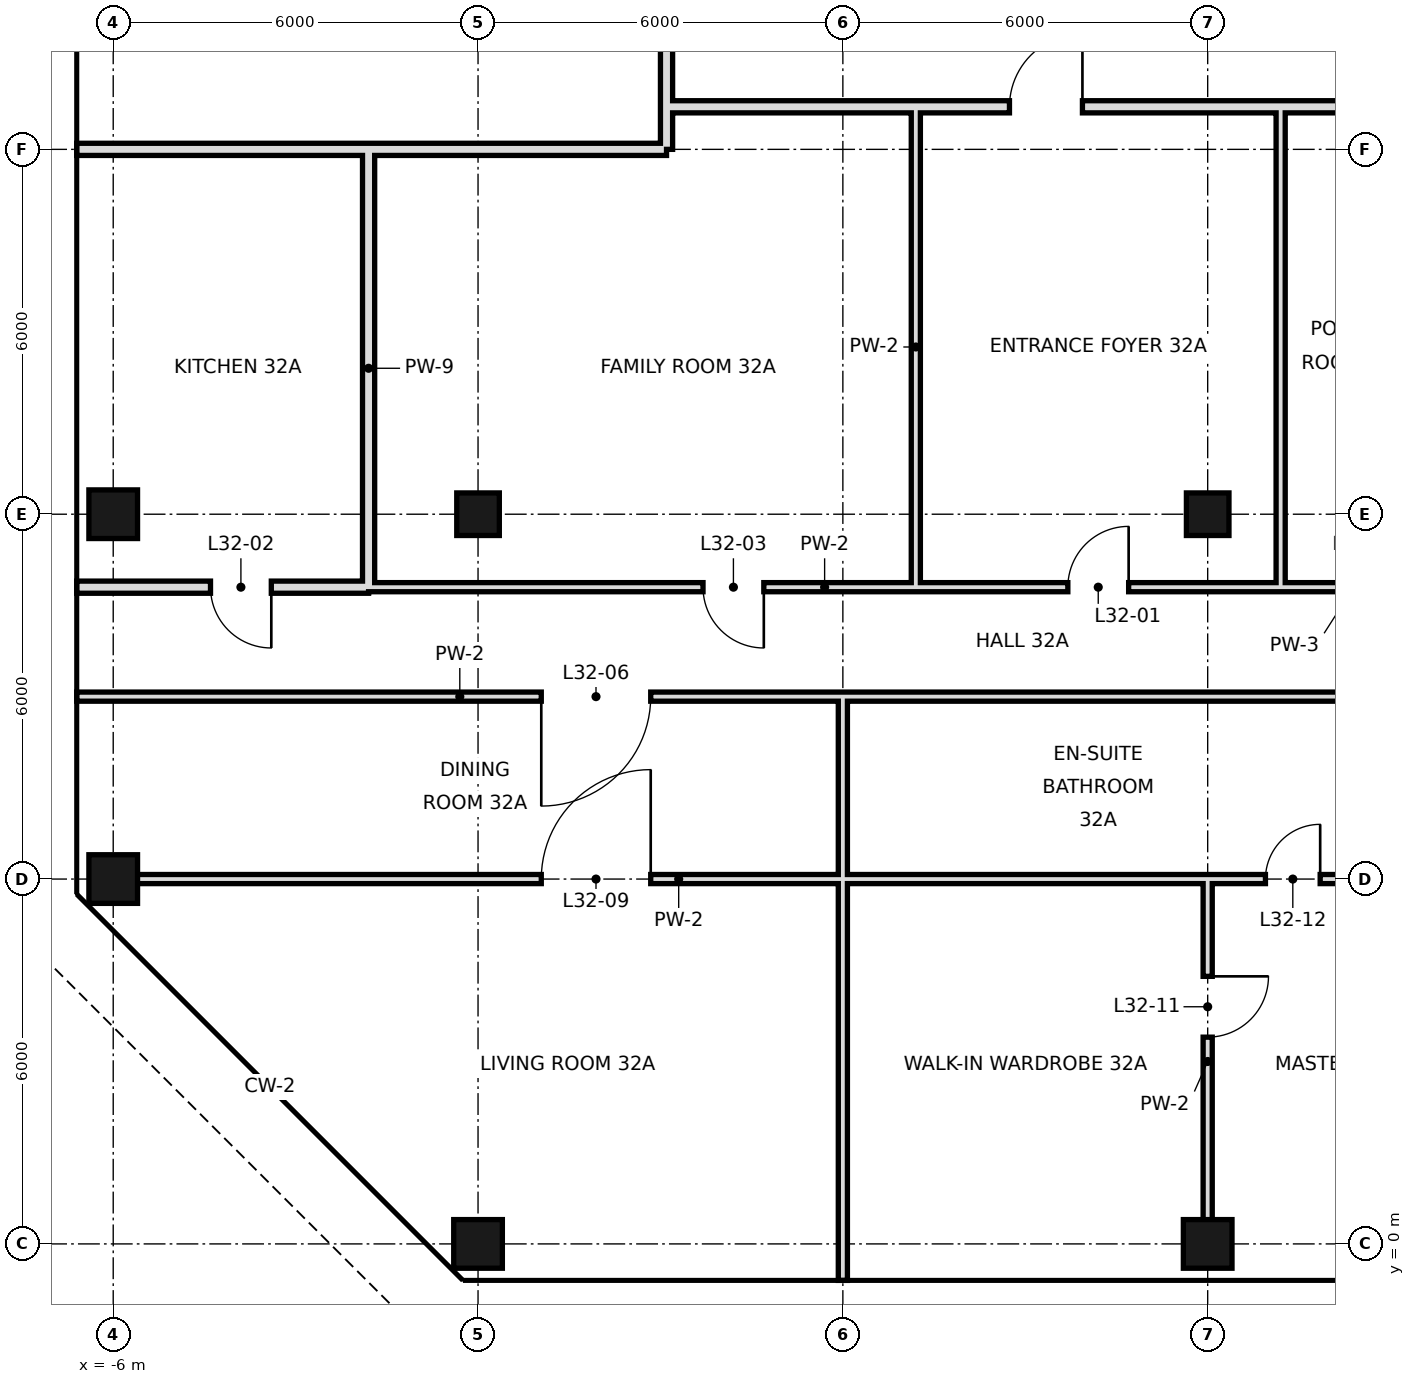
"""IFC4 building model, lengths in metres.
Left out: names, types, materials, properties, quantities, classifications, styles, units other than length and angle.
Written with IfcOpenShell. Run it as: python <this file> out.ifc"""

import sys

from ifc_helpers import new_model, si_unit, direction, frame, frame_2d, origin, origin_2d, place, context, subcontext, project, spatial, rectangle, hollow_rectangle, extrude, element, fill, save


model = new_model("IFC4")
c1 = context("Model", 3, precision=1e-05, world=origin(), true_north=direction((0.0, 1.0)))
c2 = subcontext(c1, "Body", "Model", "MODEL_VIEW")
j1 = project(units=[si_unit("LENGTHUNIT", "METRE"), si_unit("PLANEANGLEUNIT", "RADIAN")], contexts=[c1])
p1 = place(None, origin())
s1 = spatial("IfcSite", under=j1, at=p1, CompositionType="ELEMENT")
p2 = place(p1, origin())
s2 = spatial("IfcBuilding", under=s1, at=p2, CompositionType="ELEMENT")
p3 = place(p2, frame((0.0, 0.0, 143.8)))
s3 = spatial("IfcBuildingStorey", under=s2, at=p3, CompositionType="ELEMENT", Elevation=143.8)
for number, where, z_axis, x_axis in (
    (1, (-6.0, 6.0, 0.0), (0.0, 0.0, 1.0), (1.0, 0.0, 0.0)),
    (2, (-6.0, 12.0, 0.0), (0.0, 0.0, 1.0), (1.0, 0.0, 0.0)),
    (3, (0.0, 0.0, 0.0), (0.0, 0.0, 1.0), (1.0, 0.0, 0.0)),
):
    element("IfcColumn", number, at=place(p3, frame(where, z_axis=z_axis, x_axis=x_axis)), inside=s3, PredefinedType="COLUMN", context=c2, shape_type="SweptSolid", body=[
        extrude(hollow_rectangle(XDim=0.8, YDim=0.8, WallThickness=0.04, at=origin_2d()), origin(), (0.0, 0.0, 1.0), 3.6),
    ])
p4 = place(p3, frame((0.0, 12.0, 0.0), z_axis=(0.0, 0.0, 1.0), x_axis=(1.0, 0.0, 0.0)))
e4 = element("IfcColumn", 4, at=p4, inside=s3, PredefinedType="COLUMN", context=c2, shape_type="SweptSolid", body=[
    extrude(hollow_rectangle(XDim=0.7, YDim=0.7, WallThickness=0.036, at=origin_2d()), origin(), (0.0, 0.0, 1.0), 3.6),
])
p5 = place(p3, frame((12.0, 0.0, 0.0), z_axis=(0.0, 0.0, 1.0), x_axis=(1.0, 0.0, 0.0)))
e5 = element("IfcColumn", 5, at=p5, inside=s3, PredefinedType="COLUMN", context=c2, shape_type="SweptSolid", body=[
    extrude(hollow_rectangle(XDim=0.8, YDim=0.8, WallThickness=0.04, at=origin_2d()), origin(), (0.0, 0.0, 1.0), 3.6),
])
p6 = place(p3, frame((12.0, 12.0, 0.0), z_axis=(0.0, 0.0, 1.0), x_axis=(1.0, 0.0, 0.0)))
e6 = element("IfcColumn", 6, at=p6, inside=s3, PredefinedType="COLUMN", context=c2, shape_type="SweptSolid", body=[
    extrude(hollow_rectangle(XDim=0.7, YDim=0.7, WallThickness=0.036, at=origin_2d()), origin(), (0.0, 0.0, 1.0), 3.6),
])
p7 = place(p3, frame((-1.8, 10.8, 0.0), z_axis=(0.0, 0.0, 1.0), x_axis=(0.0, 1.0, 0.0)))
e7 = element("IfcWall", 7, at=p7, inside=s3, PredefinedType="SOLIDWALL", context=c2, shape_type="SweptSolid", body=[
    extrude(rectangle(XDim=7.2, YDim=0.2, at=frame_2d((3.6, 0.0))), origin(), (0.0, 0.0, 1.0), 3.42),
])
p8 = place(p3, frame((12.0, 0.0, 0.0), z_axis=(0.0, 0.0, 1.0), x_axis=(0.0, 1.0, 0.0)))
e8 = element("IfcWall", 8, at=p8, inside=s3, PredefinedType="PARTITIONING", context=c2, shape_type="SweptSolid", body=[
    extrude(rectangle(XDim=6.0, YDim=0.15, at=frame_2d((3.0, 0.0))), origin(), (0.0, 0.0, 1.0), 2.72),
])
p9 = place(p8, frame((3.4, 0.0, 0.0)))
e9 = element("IfcOpeningElement", 9, at=p9, cuts=e8, PredefinedType="OPENING", context=c2, shape_type="SweptSolid", body=[
    extrude(rectangle(XDim=1.0, YDim=2.4, at=frame_2d((0.5, 1.2))), frame((0.0, 0.085, 0.0), z_axis=(0.0, -1.0, 0.0), x_axis=(1.0, 0.0, 0.0)), (0.0, 0.0, 1.0), 0.17),
])
p10 = place(p3, frame((13.2, 10.8, 0.0), z_axis=(0.0, 0.0, 1.0), x_axis=(0.0, 1.0, 0.0)))
e10 = element("IfcWall", 10, at=p10, inside=s3, PredefinedType="PARTITIONING", context=c2, shape_type="SweptSolid", body=[
    extrude(rectangle(XDim=7.9, YDim=0.15, at=frame_2d((3.95, 0.0))), origin(), (0.0, 0.0, 1.0), 3.42),
])
p11 = place(p3, frame((3.1, 18.0, 0.0), z_axis=(0.0, 0.0, 1.0), x_axis=(0.0, 1.0, 0.0)))
e11 = element("IfcWall", 11, at=p11, inside=s3, PredefinedType="SOLIDWALL", context=c2, shape_type="SweptSolid", body=[
    extrude(rectangle(XDim=30.6, YDim=0.2, at=frame_2d((15.3, 0.0))), origin(), (0.0, 0.0, 1.0), 2.72),
])
p12 = place(p11, frame((20.27, 0.0, 0.0)))
e12 = element("IfcOpeningElement", 12, at=p12, cuts=e11, PredefinedType="OPENING", context=c2, shape_type="SweptSolid", body=[
    extrude(rectangle(XDim=1.2, YDim=2.4, at=frame_2d((0.6, 1.2))), frame((0.0, 0.11, 0.0), z_axis=(0.0, -1.0, 0.0), x_axis=(1.0, 0.0, 0.0)), (0.0, 0.0, 1.0), 0.22),
])
p13 = place(p3, frame((6.0, -0.6, 0.0), z_axis=(0.0, 0.0, 1.0), x_axis=(0.0, 1.0, 0.0)))
e13 = element("IfcWall", 13, at=p13, inside=s3, PredefinedType="PARTITIONING", context=c2, shape_type="SweptSolid", body=[
    extrude(rectangle(XDim=6.6, YDim=0.15, at=frame_2d((3.3, 0.0))), origin(), (0.0, 0.0, 1.0), 2.72),
])
p14 = place(p3, frame((6.0, 6.0, 0.0), z_axis=(0.0, 0.0, 1.0), x_axis=(0.0, 1.0, 0.0)))
e14 = element("IfcWall", 14, at=p14, inside=s3, PredefinedType="PARTITIONING", context=c2, shape_type="SweptSolid", body=[
    extrude(rectangle(XDim=3.0, YDim=0.15, at=frame_2d((1.5, 0.0))), origin(), (0.0, 0.0, 1.0), 2.72),
])
p15 = place(p3, frame((7.2, 10.8, 0.0), z_axis=(0.0, 0.0, 1.0), x_axis=(0.0, 1.0, 0.0)))
e15 = element("IfcWall", 15, at=p15, inside=s3, PredefinedType="PARTITIONING", context=c2, shape_type="SweptSolid", body=[
    extrude(rectangle(XDim=7.9, YDim=0.15, at=frame_2d((3.95, 0.0))), origin(), (0.0, 0.0, 1.0), 3.42),
])
p16 = place(p3, frame((-6.6, 10.8, 0.0), z_axis=(0.0, 0.0, 1.0), x_axis=(1.0, 0.0, 0.0)))
e16 = element("IfcWall", 16, at=p16, inside=s3, PredefinedType="SOLIDWALL", context=c2, shape_type="SweptSolid", body=[
    extrude(rectangle(XDim=4.8, YDim=0.2, at=frame_2d((2.4, 0.0))), origin(), (0.0, 0.0, 1.0), 2.97),
])
p17 = place(p16, frame((2.2, 0.0, 0.0)))
e17 = element("IfcOpeningElement", 17, at=p17, cuts=e16, PredefinedType="OPENING", context=c2, shape_type="SweptSolid", body=[
    extrude(rectangle(XDim=1.0, YDim=2.4, at=frame_2d((0.5, 1.2))), frame((0.0, 0.11, 0.0), z_axis=(0.0, -1.0, 0.0), x_axis=(1.0, 0.0, 0.0)), (0.0, 0.0, 1.0), 0.22),
])
p18 = place(p3, frame((-1.8, 10.8, 0.0), z_axis=(0.0, 0.0, 1.0), x_axis=(1.0, 0.0, 0.0)))
e18 = element("IfcWall", 18, at=p18, inside=s3, PredefinedType="PARTITIONING", context=c2, shape_type="SweptSolid", body=[
    extrude(rectangle(XDim=15.0, YDim=0.15, at=frame_2d((7.5, 0.0))), origin(), (0.0, 0.0, 1.0), 3.42),
])
p19 = place(p18, frame((11.5, 0.0, 0.0)))
e19 = element("IfcOpeningElement", 19, at=p19, cuts=e18, PredefinedType="OPENING", context=c2, shape_type="SweptSolid", body=[
    extrude(rectangle(XDim=1.0, YDim=2.4, at=frame_2d((0.5, 1.2))), frame((0.0, 0.085, 0.0), z_axis=(0.0, -1.0, 0.0), x_axis=(1.0, 0.0, 0.0)), (0.0, 0.0, 1.0), 0.17),
])
p20 = place(p18, frame((5.5, 0.0, 0.0)))
e20 = element("IfcOpeningElement", 20, at=p20, cuts=e18, PredefinedType="OPENING", context=c2, shape_type="SweptSolid", body=[
    extrude(rectangle(XDim=1.0, YDim=2.4, at=frame_2d((0.5, 1.2))), frame((0.0, 0.085, 0.0), z_axis=(0.0, -1.0, 0.0), x_axis=(1.0, 0.0, 0.0)), (0.0, 0.0, 1.0), 0.17),
])
p21 = place(p3, frame((13.2, 10.8, 0.0), z_axis=(0.0, 0.0, 1.0), x_axis=(1.0, 0.0, 0.0)))
e21 = element("IfcWall", 21, at=p21, inside=s3, PredefinedType="PARTITIONING", context=c2, shape_type="SweptSolid", body=[
    extrude(rectangle(XDim=2.4, YDim=0.15, at=frame_2d((1.2, 0.0))), origin(), (0.0, 0.0, 1.0), 3.42),
])
p22 = place(p21, frame((0.95, 0.0, 0.0)))
e22 = element("IfcOpeningElement", 22, at=p22, cuts=e21, PredefinedType="OPENING", context=c2, shape_type="SweptSolid", body=[
    extrude(rectangle(XDim=0.9, YDim=2.4, at=frame_2d((0.45, 1.2))), frame((0.0, 0.085, 0.0), z_axis=(0.0, -1.0, 0.0), x_axis=(1.0, 0.0, 0.0)), (0.0, 0.0, 1.0), 0.17),
])
p23 = place(p3, frame((-1.8, 18.0, 0.0), z_axis=(0.0, 0.0, 1.0), x_axis=(1.0, 0.0, 0.0)))
e23 = element("IfcWall", 23, at=p23, inside=s3, PredefinedType="SOLIDWALL", context=c2, shape_type="SweptSolid", body=[
    extrude(rectangle(XDim=4.9, YDim=0.2, at=frame_2d((2.45, 0.0))), origin(), (0.0, 0.0, 1.0), 2.72),
])
p24 = place(p3, frame((-6.6, 18.0, 0.0), z_axis=(0.0, 0.0, 1.0), x_axis=(1.0, 0.0, 0.0)))
e24 = element("IfcWall", 24, at=p24, inside=s3, PredefinedType="SOLIDWALL", context=c2, shape_type="SweptSolid", body=[
    extrude(rectangle(XDim=4.8, YDim=0.2, at=frame_2d((2.4, 0.0))), origin(), (0.0, 0.0, 1.0), 2.72),
])
p25 = place(p3, frame((3.1, 18.7, 0.0), z_axis=(0.0, 0.0, 1.0), x_axis=(1.0, 0.0, 0.0)))
e25 = element("IfcWall", 25, at=p25, inside=s3, PredefinedType="SOLIDWALL", context=c2, shape_type="SweptSolid", body=[
    extrude(rectangle(XDim=41.8, YDim=0.2, at=frame_2d((20.9, 0.0))), origin(), (0.0, 0.0, 1.0), 2.72),
])
p26 = place(p25, frame((5.64, 0.0, 0.0)))
e26 = element("IfcOpeningElement", 26, at=p26, cuts=e25, PredefinedType="OPENING", context=c2, shape_type="SweptSolid", body=[
    extrude(rectangle(XDim=1.2, YDim=2.4, at=frame_2d((0.6, 1.2))), frame((0.0, 0.11, 0.0), z_axis=(0.0, -1.0, 0.0), x_axis=(1.0, 0.0, 0.0)), (0.0, 0.0, 1.0), 0.22),
])
p27 = place(p25, frame((24.16, 0.0, 0.0)))
e27 = element("IfcOpeningElement", 27, at=p27, cuts=e25, PredefinedType="OPENING", context=c2, shape_type="SweptSolid", body=[
    extrude(rectangle(XDim=1.2, YDim=2.4, at=frame_2d((0.6, 1.2))), frame((0.0, 0.11, 0.0), z_axis=(0.0, -1.0, 0.0), x_axis=(1.0, 0.0, 0.0)), (0.0, 0.0, 1.0), 0.22),
])
p28 = place(p3, frame((-6.0, 6.0, 0.0), z_axis=(0.0, 0.0, 1.0), x_axis=(1.0, 0.0, 0.0)))
e28 = element("IfcWall", 28, at=p28, inside=s3, PredefinedType="PARTITIONING", context=c2, shape_type="SweptSolid", body=[
    extrude(rectangle(XDim=12.0, YDim=0.15, at=frame_2d((6.0, 0.0))), origin(), (0.0, 0.0, 1.0), 2.97),
])
p29 = place(p28, frame((7.04, 0.0, 0.0)))
e29 = element("IfcOpeningElement", 29, at=p29, cuts=e28, PredefinedType="OPENING", context=c2, shape_type="SweptSolid", body=[
    extrude(rectangle(XDim=1.8, YDim=2.4, at=frame_2d((0.9, 1.2))), frame((0.0, 0.085, 0.0), z_axis=(0.0, -1.0, 0.0), x_axis=(1.0, 0.0, 0.0)), (0.0, 0.0, 1.0), 0.17),
])
p30 = place(p3, frame((6.0, 6.0, 0.0), z_axis=(0.0, 0.0, 1.0), x_axis=(1.0, 0.0, 0.0)))
e30 = element("IfcWall", 30, at=p30, inside=s3, PredefinedType="PARTITIONING", context=c2, shape_type="SweptSolid", body=[
    extrude(rectangle(XDim=8.4, YDim=0.15, at=frame_2d((4.2, 0.0))), origin(), (0.0, 0.0, 1.0), 2.97),
])
p31 = place(p30, frame((6.95, 0.0, 0.0)))
e31 = element("IfcOpeningElement", 31, at=p31, cuts=e30, PredefinedType="OPENING", context=c2, shape_type="SweptSolid", body=[
    extrude(rectangle(XDim=0.9, YDim=2.4, at=frame_2d((0.45, 1.2))), frame((0.0, 0.085, 0.0), z_axis=(0.0, -1.0, 0.0), x_axis=(1.0, 0.0, 0.0)), (0.0, 0.0, 1.0), 0.17),
])
p32 = place(p3, frame((-6.6, 9.0, 0.0), z_axis=(0.0, 0.0, 1.0), x_axis=(1.0, 0.0, 0.0)))
e32 = element("IfcWall", 32, at=p32, inside=s3, PredefinedType="PARTITIONING", context=c2, shape_type="SweptSolid", body=[
    extrude(rectangle(XDim=12.6, YDim=0.15, at=frame_2d((6.3, 0.0))), origin(), (0.0, 0.0, 1.0), 3.42),
])
p33 = place(p32, frame((7.64, 0.0, 0.0)))
e33 = element("IfcOpeningElement", 33, at=p33, cuts=e32, PredefinedType="OPENING", context=c2, shape_type="SweptSolid", body=[
    extrude(rectangle(XDim=1.8, YDim=2.4, at=frame_2d((0.9, 1.2))), frame((0.0, 0.085, 0.0), z_axis=(0.0, -1.0, 0.0), x_axis=(1.0, 0.0, 0.0)), (0.0, 0.0, 1.0), 0.17),
])
p34 = place(p3, frame((6.0, 9.0, 0.0), z_axis=(0.0, 0.0, 1.0), x_axis=(1.0, 0.0, 0.0)))
e34 = element("IfcWall", 34, at=p34, inside=s3, PredefinedType="PARTITIONING", context=c2, shape_type="SweptSolid", body=[
    extrude(rectangle(XDim=8.4, YDim=0.15, at=frame_2d((4.2, 0.0))), origin(), (0.0, 0.0, 1.0), 3.42),
])
p35 = place(p19, frame((1.0, 0.0, 0.0), z_axis=(0.0, 0.0, 1.0), x_axis=(-1.0, 0.0, 0.0)))
e35 = element("IfcDoor", 35, at=p35, inside=s3, OperationType="SINGLE_SWING_LEFT", PredefinedType="DOOR", context=c2, shape_type="SweptSolid", body=[
    extrude(rectangle(XDim=1.0, YDim=2.4, at=frame_2d((0.5, 1.2))), frame((0.0, 0.025, 0.0), z_axis=(0.0, -1.0, 0.0), x_axis=(1.0, 0.0, 0.0)), (0.0, 0.0, 1.0), 0.05),
])
fill(e19, e35)
p36 = place(p17, origin())
e36 = element("IfcDoor", 36, at=p36, inside=s3, OperationType="SINGLE_SWING_RIGHT", PredefinedType="DOOR", context=c2, shape_type="SweptSolid", body=[
    extrude(rectangle(XDim=1.0, YDim=2.4, at=frame_2d((0.5, 1.2))), frame((0.0, 0.025, 0.0), z_axis=(0.0, -1.0, 0.0), x_axis=(1.0, 0.0, 0.0)), (0.0, 0.0, 1.0), 0.05),
])
fill(e17, e36)
p37 = place(p20, origin())
e37 = element("IfcDoor", 37, at=p37, inside=s3, OperationType="SINGLE_SWING_RIGHT", PredefinedType="DOOR", context=c2, shape_type="SweptSolid", body=[
    extrude(rectangle(XDim=1.0, YDim=2.4, at=frame_2d((0.5, 1.2))), frame((0.0, 0.025, 0.0), z_axis=(0.0, -1.0, 0.0), x_axis=(1.0, 0.0, 0.0)), (0.0, 0.0, 1.0), 0.05),
])
fill(e20, e37)
p38 = place(p33, frame((1.8, 0.0, 0.0), z_axis=(0.0, 0.0, 1.0), x_axis=(-1.0, 0.0, 0.0)))
e38 = element("IfcDoor", 38, at=p38, inside=s3, OperationType="SINGLE_SWING_RIGHT", PredefinedType="DOOR", context=c2, shape_type="SweptSolid", body=[
    extrude(rectangle(XDim=1.8, YDim=2.4, at=frame_2d((0.9, 1.2))), frame((0.0, 0.025, 0.0), z_axis=(0.0, -1.0, 0.0), x_axis=(1.0, 0.0, 0.0)), (0.0, 0.0, 1.0), 0.05),
])
fill(e33, e38)
p39 = place(p29, frame((1.8, 0.0, 0.0), z_axis=(0.0, 0.0, 1.0), x_axis=(-1.0, 0.0, 0.0)))
e39 = element("IfcDoor", 39, at=p39, inside=s3, OperationType="SINGLE_SWING_LEFT", PredefinedType="DOOR", context=c2, shape_type="SweptSolid", body=[
    extrude(rectangle(XDim=1.8, YDim=2.4, at=frame_2d((0.9, 1.2))), frame((0.0, 0.025, 0.0), z_axis=(0.0, -1.0, 0.0), x_axis=(1.0, 0.0, 0.0)), (0.0, 0.0, 1.0), 0.05),
])
fill(e29, e39)
p40 = place(p9, origin())
e40 = element("IfcDoor", 40, at=p40, inside=s3, OperationType="SINGLE_SWING_RIGHT", PredefinedType="DOOR", context=c2, shape_type="SweptSolid", body=[
    extrude(rectangle(XDim=1.0, YDim=2.4, at=frame_2d((0.5, 1.2))), frame((0.0, 0.025, 0.0), z_axis=(0.0, -1.0, 0.0), x_axis=(1.0, 0.0, 0.0)), (0.0, 0.0, 1.0), 0.05),
])
fill(e9, e40)
p41 = place(p31, frame((0.9, 0.0, 0.0), z_axis=(0.0, 0.0, 1.0), x_axis=(-1.0, 0.0, 0.0)))
e41 = element("IfcDoor", 41, at=p41, inside=s3, OperationType="SINGLE_SWING_LEFT", PredefinedType="DOOR", context=c2, shape_type="SweptSolid", body=[
    extrude(rectangle(XDim=0.9, YDim=2.4, at=frame_2d((0.45, 1.2))), frame((0.0, 0.025, 0.0), z_axis=(0.0, -1.0, 0.0), x_axis=(1.0, 0.0, 0.0)), (0.0, 0.0, 1.0), 0.05),
])
fill(e31, e41)
p42 = place(p26, frame((1.2, 0.0, 0.0), z_axis=(0.0, 0.0, 1.0), x_axis=(-1.0, 0.0, 0.0)))
e42 = element("IfcDoor", 42, at=p42, inside=s3, OperationType="SINGLE_SWING_LEFT", PredefinedType="DOOR", context=c2, shape_type="SweptSolid", body=[
    extrude(rectangle(XDim=1.2, YDim=2.4, at=frame_2d((0.6, 1.2))), frame((0.0, 0.025, 0.0), z_axis=(0.0, -1.0, 0.0), x_axis=(1.0, 0.0, 0.0)), (0.0, 0.0, 1.0), 0.05),
])
fill(e26, e42)
save(model, sys.argv[1])
